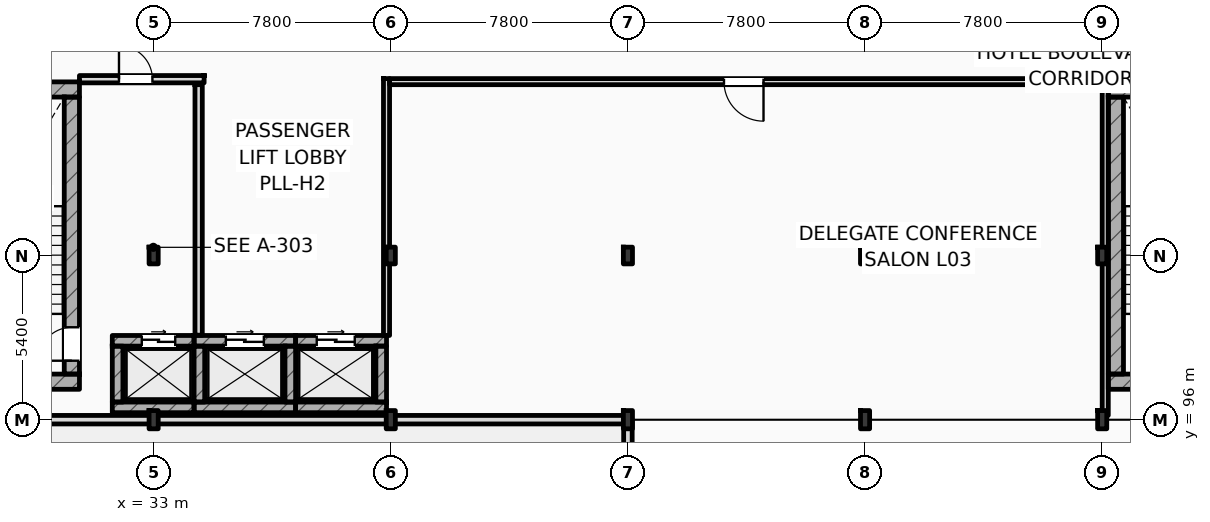
"""IFC4 building model, lengths in metres.
Left out: names, types, materials, properties, quantities, classifications, styles, units other than length and angle.
Written with IfcOpenShell. Run it as: python <this file> out.ifc"""

import sys

from ifc_helpers import new_model, si_unit, direction, frame, frame_2d, origin, origin_2d, place, context, subcontext, project, spatial, rectangle, i_section, extrude, element, fill, save


model = new_model("IFC4")
c1 = context("Model", 3, precision=1e-05, world=origin(), true_north=direction((0.0, 1.0)))
c2 = subcontext(c1, "Body", "Model", "MODEL_VIEW")
j1 = project(units=[si_unit("LENGTHUNIT", "METRE"), si_unit("PLANEANGLEUNIT", "RADIAN")], contexts=[c1])
p1 = place(None, origin())
s1 = spatial("IfcSite", under=j1, at=p1, CompositionType="ELEMENT")
p2 = place(p1, origin())
s2 = spatial("IfcBuilding", under=s1, at=p2, CompositionType="ELEMENT")
p3 = place(p2, frame((0.0, 0.0, 16.2)))
s3 = spatial("IfcBuildingStorey", under=s2, at=p3, CompositionType="ELEMENT", Elevation=16.2)
p4 = place(p3, frame((33.0, 96.0, 0.0), z_axis=(0.0, 0.0, 1.0), x_axis=(1.0, 0.0, 0.0)))
e1 = element("IfcColumn", 1, at=p4, inside=s3, PredefinedType="COLUMN", context=c2, shape_type="SweptSolid", body=[
    extrude(i_section(OverallWidth=0.3, OverallDepth=0.6, WebThickness=0.015, FlangeThickness=0.03, FilletRadius=0.027, at=origin_2d()), origin(), (0.0, 0.0, 1.0), 4.2),
])
p5 = place(p3, frame((33.0, 101.4, 0.0), z_axis=(0.0, 0.0, 1.0), x_axis=(1.0, 0.0, 0.0)))
e2 = element("IfcColumn", 2, at=p5, inside=s3, PredefinedType="COLUMN", context=c2, shape_type="SweptSolid", body=[
    extrude(i_section(OverallWidth=0.3, OverallDepth=0.55, WebThickness=0.015, FlangeThickness=0.029, FilletRadius=0.027, at=origin_2d()), origin(), (0.0, 0.0, 1.0), 4.2),
])
p6 = place(p3, frame((40.8, 96.0, 0.0), z_axis=(0.0, 0.0, 1.0), x_axis=(1.0, 0.0, 0.0)))
e3 = element("IfcColumn", 3, at=p6, inside=s3, PredefinedType="COLUMN", context=c2, shape_type="SweptSolid", body=[
    extrude(i_section(OverallWidth=0.3, OverallDepth=0.6, WebThickness=0.015, FlangeThickness=0.03, FilletRadius=0.027, at=origin_2d()), origin(), (0.0, 0.0, 1.0), 4.2),
])
p7 = place(p3, frame((40.8, 101.4, 0.0), z_axis=(0.0, 0.0, 1.0), x_axis=(1.0, 0.0, 0.0)))
e4 = element("IfcColumn", 4, at=p7, inside=s3, PredefinedType="COLUMN", context=c2, shape_type="SweptSolid", body=[
    extrude(i_section(OverallWidth=0.3, OverallDepth=0.55, WebThickness=0.015, FlangeThickness=0.029, FilletRadius=0.027, at=origin_2d()), origin(), (0.0, 0.0, 1.0), 4.2),
])
p8 = place(p3, frame((48.6, 96.0, 0.0), z_axis=(0.0, 0.0, 1.0), x_axis=(1.0, 0.0, 0.0)))
e5 = element("IfcColumn", 5, at=p8, inside=s3, PredefinedType="COLUMN", context=c2, shape_type="SweptSolid", body=[
    extrude(i_section(OverallWidth=0.3, OverallDepth=0.6, WebThickness=0.015, FlangeThickness=0.03, FilletRadius=0.027, at=origin_2d()), origin(), (0.0, 0.0, 1.0), 4.2),
])
p9 = place(p3, frame((48.6, 101.4, 0.0), z_axis=(0.0, 0.0, 1.0), x_axis=(1.0, 0.0, 0.0)))
e6 = element("IfcColumn", 6, at=p9, inside=s3, PredefinedType="COLUMN", context=c2, shape_type="SweptSolid", body=[
    extrude(i_section(OverallWidth=0.3, OverallDepth=0.55, WebThickness=0.015, FlangeThickness=0.029, FilletRadius=0.027, at=origin_2d()), origin(), (0.0, 0.0, 1.0), 4.2),
])
p10 = place(p3, frame((56.4, 96.0, 0.0), z_axis=(0.0, 0.0, 1.0), x_axis=(1.0, 0.0, 0.0)))
e7 = element("IfcColumn", 7, at=p10, inside=s3, PredefinedType="COLUMN", context=c2, shape_type="SweptSolid", body=[
    extrude(i_section(OverallWidth=0.3, OverallDepth=0.6, WebThickness=0.015, FlangeThickness=0.03, FilletRadius=0.027, at=origin_2d()), origin(), (0.0, 0.0, 1.0), 4.2),
])
p11 = place(p3, frame((56.4, 101.4, 0.0), z_axis=(0.0, 0.0, 1.0), x_axis=(1.0, 0.0, 0.0)))
e8 = element("IfcColumn", 8, at=p11, inside=s3, PredefinedType="COLUMN", context=c2, shape_type="SweptSolid", body=[
    extrude(i_section(OverallWidth=0.3, OverallDepth=0.55, WebThickness=0.015, FlangeThickness=0.029, FilletRadius=0.027, at=origin_2d()), origin(), (0.0, 0.0, 1.0), 4.2),
])
p12 = place(p3, frame((64.2, 96.0, 0.0), z_axis=(0.0, 0.0, 1.0), x_axis=(1.0, 0.0, 0.0)))
e9 = element("IfcColumn", 9, at=p12, inside=s3, PredefinedType="COLUMN", context=c2, shape_type="SweptSolid", body=[
    extrude(i_section(OverallWidth=0.3, OverallDepth=0.6, WebThickness=0.015, FlangeThickness=0.03, FilletRadius=0.027, at=origin_2d()), origin(), (0.0, 0.0, 1.0), 4.2),
])
p13 = place(p3, frame((64.2, 101.4, 0.0), z_axis=(0.0, 0.0, 1.0), x_axis=(1.0, 0.0, 0.0)))
e10 = element("IfcColumn", 10, at=p13, inside=s3, PredefinedType="COLUMN", context=c2, shape_type="SweptSolid", body=[
    extrude(i_section(OverallWidth=0.3, OverallDepth=0.55, WebThickness=0.015, FlangeThickness=0.029, FilletRadius=0.027, at=origin_2d()), origin(), (0.0, 0.0, 1.0), 4.2),
])
for number, where, z_axis, x_axis in (
    (11, (25.4, 106.862, 0.0), (0.0, 0.0, 1.0), (1.0, 0.0, 0.0)),
    (12, (25.4, 97.25, 0.0), (0.0, 0.0, 1.0), (1.0, 0.0, 0.0)),
):
    element("IfcWall", number, at=place(p3, frame(where, z_axis=z_axis, x_axis=x_axis)), inside=s3, PredefinedType="SHEAR", context=c2, shape_type="SweptSolid", body=[
        extrude(rectangle(XDim=5.16, YDim=0.5, at=frame_2d((2.58, 0.0))), origin(), (0.0, 0.0, 1.0), 4.2),
    ])
p14 = place(p3, frame((30.31, 97.5, 0.0), z_axis=(0.0, 0.0, 1.0), x_axis=(0.0, 1.0, 0.0)))
e13 = element("IfcWall", 13, at=p14, inside=s3, PredefinedType="SHEAR", context=c2, shape_type="SweptSolid", body=[
    extrude(rectangle(XDim=9.112, YDim=0.5, at=frame_2d((4.556, 0.0))), origin(), (0.0, 0.0, 1.0), 4.2),
])
p15 = place(p14, frame((0.44, 0.0, 0.0)))
e14 = element("IfcOpeningElement", 14, at=p15, cuts=e13, PredefinedType="OPENING", context=c2, shape_type="SweptSolid", body=[
    extrude(rectangle(XDim=1.1, YDim=2.2, at=frame_2d((0.55, 1.1))), frame((0.0, 0.26, 0.0), z_axis=(0.0, -1.0, 0.0), x_axis=(1.0, 0.0, 0.0)), (0.0, 0.0, 1.0), 0.52),
])
for number, where, z_axis, x_axis in (
    (15, (64.4, 106.862, 0.0), (0.0, 0.0, 1.0), (1.0, 0.0, 0.0)),
    (16, (64.4, 97.25, 0.0), (0.0, 0.0, 1.0), (1.0, 0.0, 0.0)),
):
    element("IfcWall", number, at=place(p3, frame(where, z_axis=z_axis, x_axis=x_axis)), inside=s3, PredefinedType="SHEAR", context=c2, shape_type="SweptSolid", body=[
        extrude(rectangle(XDim=5.16, YDim=0.5, at=frame_2d((2.58, 0.0))), origin(), (0.0, 0.0, 1.0), 4.2),
    ])
p16 = place(p3, frame((64.65, 97.5, 0.0), z_axis=(0.0, 0.0, 1.0), x_axis=(0.0, 1.0, 0.0)))
e17 = element("IfcWall", 17, at=p16, inside=s3, PredefinedType="SHEAR", context=c2, shape_type="SweptSolid", body=[
    extrude(rectangle(XDim=9.112, YDim=0.5, at=frame_2d((4.556, 0.0))), origin(), (0.0, 0.0, 1.0), 4.2),
])
p17 = place(p3, frame((48.6, 88.0, 0.0), z_axis=(0.0, 0.0, 1.0), x_axis=(0.0, 1.0, 0.0)))
e18 = element("IfcWall", 18, at=p17, inside=s3, PredefinedType="STANDARD", context=c2, shape_type="SweptSolid", body=[
    extrude(rectangle(XDim=8.0, YDim=0.28, at=frame_2d((4.0, 0.0))), origin(), (0.0, 0.0, 1.0), 3.92),
])
p18 = place(p3, frame((25.2, 96.0, 0.0), z_axis=(0.0, 0.0, 1.0), x_axis=(1.0, 0.0, 0.0)))
e19 = element("IfcWall", 19, at=p18, inside=s3, PredefinedType="STANDARD", context=c2, shape_type="SweptSolid", body=[
    extrude(rectangle(XDim=23.4, YDim=0.28, at=frame_2d((11.7, 0.0))), origin(), (0.0, 0.0, 1.0), 3.46),
])
p19 = place(p3, frame((31.64, 98.595, 0.0), z_axis=(0.0, 0.0, 1.0), x_axis=(1.0, 0.0, 0.0)))
e20 = element("IfcWall", 20, at=p19, inside=s3, PredefinedType="SHEAR", context=c2, shape_type="SweptSolid", body=[
    extrude(rectangle(XDim=2.69, YDim=0.35, at=frame_2d((1.345, 0.0))), origin(), (0.0, 0.0, 1.0), 3.92),
])
p20 = place(p19, frame((0.97, 0.0, 0.0)))
e21 = element("IfcOpeningElement", 21, at=p20, cuts=e20, PredefinedType="OPENING", context=c2, shape_type="SweptSolid", body=[
    extrude(rectangle(XDim=1.1, YDim=2.2, at=frame_2d((0.55, 1.1))), frame((0.0, 0.185, 0.0), z_axis=(0.0, -1.0, 0.0), x_axis=(1.0, 0.0, 0.0)), (0.0, 0.0, 1.0), 0.37),
])
p21 = place(p3, frame((31.64, 96.405, 0.0), z_axis=(0.0, 0.0, 1.0), x_axis=(1.0, 0.0, 0.0)))
e22 = element("IfcWall", 22, at=p21, inside=s3, PredefinedType="SHEAR", context=c2, shape_type="SweptSolid", body=[
    extrude(rectangle(XDim=2.69, YDim=0.35, at=frame_2d((1.345, 0.0))), origin(), (0.0, 0.0, 1.0), 3.92),
])
p22 = place(p3, frame((31.815, 96.58, 0.0), z_axis=(0.0, 0.0, 1.0), x_axis=(0.0, 1.0, 0.0)))
e23 = element("IfcWall", 23, at=p22, inside=s3, PredefinedType="SHEAR", context=c2, shape_type="SweptSolid", body=[
    extrude(rectangle(XDim=1.84, YDim=0.35, at=frame_2d((0.92, 0.0))), origin(), (0.0, 0.0, 1.0), 3.92),
])
p23 = place(p3, frame((34.33, 98.595, 0.0), z_axis=(0.0, 0.0, 1.0), x_axis=(1.0, 0.0, 0.0)))
e24 = element("IfcWall", 24, at=p23, inside=s3, PredefinedType="SHEAR", context=c2, shape_type="SweptSolid", body=[
    extrude(rectangle(XDim=3.34, YDim=0.35, at=frame_2d((1.67, 0.0))), origin(), (0.0, 0.0, 1.0), 3.92),
])
p24 = place(p23, frame((1.045, 0.0, 0.0)))
e25 = element("IfcOpeningElement", 25, at=p24, cuts=e24, PredefinedType="OPENING", context=c2, shape_type="SweptSolid", body=[
    extrude(rectangle(XDim=1.25, YDim=2.25, at=frame_2d((0.625, 1.125))), frame((0.0, 0.185, 0.0), z_axis=(0.0, -1.0, 0.0), x_axis=(1.0, 0.0, 0.0)), (0.0, 0.0, 1.0), 0.37),
])
p25 = place(p3, frame((34.33, 96.405, 0.0), z_axis=(0.0, 0.0, 1.0), x_axis=(1.0, 0.0, 0.0)))
e26 = element("IfcWall", 26, at=p25, inside=s3, PredefinedType="SHEAR", context=c2, shape_type="SweptSolid", body=[
    extrude(rectangle(XDim=3.34, YDim=0.35, at=frame_2d((1.67, 0.0))), origin(), (0.0, 0.0, 1.0), 3.92),
])
for number, where, z_axis, x_axis in (
    (27, (34.505, 96.58, 0.0), (0.0, 0.0, 1.0), (0.0, 1.0, 0.0)),
    (28, (37.495, 96.58, 0.0), (0.0, 0.0, 1.0), (0.0, 1.0, 0.0)),
):
    element("IfcWall", number, at=place(p3, frame(where, z_axis=z_axis, x_axis=x_axis)), inside=s3, PredefinedType="SHEAR", context=c2, shape_type="SweptSolid", body=[
        extrude(rectangle(XDim=1.84, YDim=0.35, at=frame_2d((0.92, 0.0))), origin(), (0.0, 0.0, 1.0), 3.92),
    ])
p26 = place(p3, frame((37.67, 98.595, 0.0), z_axis=(0.0, 0.0, 1.0), x_axis=(1.0, 0.0, 0.0)))
e29 = element("IfcWall", 29, at=p26, inside=s3, PredefinedType="SHEAR", context=c2, shape_type="SweptSolid", body=[
    extrude(rectangle(XDim=2.99, YDim=0.35, at=frame_2d((1.495, 0.0))), origin(), (0.0, 0.0, 1.0), 3.92),
])
p27 = place(p26, frame((0.695, 0.0, 0.0)))
e30 = element("IfcOpeningElement", 30, at=p27, cuts=e29, PredefinedType="OPENING", context=c2, shape_type="SweptSolid", body=[
    extrude(rectangle(XDim=1.25, YDim=2.25, at=frame_2d((0.625, 1.125))), frame((0.0, 0.185, 0.0), z_axis=(0.0, -1.0, 0.0), x_axis=(1.0, 0.0, 0.0)), (0.0, 0.0, 1.0), 0.37),
])
p28 = place(p3, frame((37.67, 96.405, 0.0), z_axis=(0.0, 0.0, 1.0), x_axis=(1.0, 0.0, 0.0)))
e31 = element("IfcWall", 31, at=p28, inside=s3, PredefinedType="SHEAR", context=c2, shape_type="SweptSolid", body=[
    extrude(rectangle(XDim=2.99, YDim=0.35, at=frame_2d((1.495, 0.0))), origin(), (0.0, 0.0, 1.0), 3.92),
])
p29 = place(p3, frame((40.485, 96.58, 0.0), z_axis=(0.0, 0.0, 1.0), x_axis=(0.0, 1.0, 0.0)))
e32 = element("IfcWall", 32, at=p29, inside=s3, PredefinedType="SHEAR", context=c2, shape_type="SweptSolid", body=[
    extrude(rectangle(XDim=1.84, YDim=0.35, at=frame_2d((0.92, 0.0))), origin(), (0.0, 0.0, 1.0), 3.51),
])
p30 = place(p3, frame((34.48, 98.78, 0.0), z_axis=(0.0, 0.0, 1.0), x_axis=(0.0, 1.0, 0.0)))
e33 = element("IfcWall", 33, at=p30, inside=s3, PredefinedType="STANDARD", context=c2, shape_type="SweptSolid", body=[
    extrude(rectangle(XDim=8.24, YDim=0.24, at=frame_2d((4.12, 0.0))), origin(), (0.0, 0.0, 1.0), 3.92),
])
p31 = place(p3, frame((30.56, 107.2, 0.0), z_axis=(0.0, 0.0, 1.0), x_axis=(1.0, 0.0, 0.0)))
e34 = element("IfcWall", 34, at=p31, inside=s3, PredefinedType="STANDARD", context=c2, shape_type="SweptSolid", body=[
    extrude(rectangle(XDim=4.1, YDim=0.24, at=frame_2d((2.05, 0.0))), origin(), (0.0, 0.0, 1.0), 3.92),
])
p32 = place(p31, frame((1.3, 0.0, 0.0)))
e35 = element("IfcOpeningElement", 35, at=p32, cuts=e34, PredefinedType="OPENING", context=c2, shape_type="SweptSolid", body=[
    extrude(rectangle(XDim=1.1, YDim=2.2, at=frame_2d((0.55, 1.1))), frame((0.0, 0.13, 0.0), z_axis=(0.0, -1.0, 0.0), x_axis=(1.0, 0.0, 0.0)), (0.0, 0.0, 1.0), 0.26),
])
p33 = place(p3, frame((40.76, 107.12, 0.0), z_axis=(0.0, 0.0, 1.0), x_axis=(1.0, 0.0, 0.0)))
e36 = element("IfcWall", 36, at=p33, inside=s3, PredefinedType="PARTITIONING", context=c2, shape_type="SweptSolid", body=[
    extrude(rectangle(XDim=23.44, YDim=0.2, at=frame_2d((11.72, 0.0))), origin(), (0.0, 0.0, 1.0), 3.92),
])
p34 = place(p33, frame((11.0, 0.0, 0.0)))
e37 = element("IfcOpeningElement", 37, at=p34, cuts=e36, PredefinedType="OPENING", context=c2, shape_type="SweptSolid", body=[
    extrude(rectangle(XDim=1.3, YDim=2.2, at=frame_2d((0.65, 1.1))), frame((0.0, 0.11, 0.0), z_axis=(0.0, -1.0, 0.0), x_axis=(1.0, 0.0, 0.0)), (0.0, 0.0, 1.0), 0.22),
])
p35 = place(p3, frame((40.66, 98.77, 0.0), z_axis=(0.0, 0.0, 1.0), x_axis=(0.0, 1.0, 0.0)))
e38 = element("IfcWall", 38, at=p35, inside=s3, PredefinedType="PARTITIONING", context=c2, shape_type="SweptSolid", body=[
    extrude(rectangle(XDim=8.45, YDim=0.2, at=frame_2d((4.225, 0.0))), origin(), (0.0, 0.0, 1.0), 3.51),
])
p36 = place(p3, frame((64.3, 96.14, 0.0), z_axis=(0.0, 0.0, 1.0), x_axis=(0.0, 1.0, 0.0)))
e39 = element("IfcWall", 39, at=p36, inside=s3, PredefinedType="PARTITIONING", context=c2, shape_type="SweptSolid", body=[
    extrude(rectangle(XDim=11.08, YDim=0.2, at=frame_2d((5.54, 0.0))), origin(), (0.0, 0.0, 1.0), 3.51),
])
p37 = place(p15, origin())
e40 = element("IfcDoor", 40, at=p37, inside=s3, OperationType="SINGLE_SWING_LEFT", PredefinedType="DOOR", context=c2, shape_type="SweptSolid", body=[
    extrude(rectangle(XDim=1.1, YDim=2.2, at=frame_2d((0.55, 1.1))), frame((0.0, 0.025, 0.0), z_axis=(0.0, -1.0, 0.0), x_axis=(1.0, 0.0, 0.0)), (0.0, 0.0, 1.0), 0.05),
])
fill(e14, e40)
p38 = place(p20, origin())
e41 = element("IfcDoor", 41, at=p38, inside=s3, OperationType="SLIDING_TO_LEFT", PredefinedType="DOOR", context=c2, shape_type="SweptSolid", body=[
    extrude(rectangle(XDim=1.1, YDim=2.2, at=frame_2d((0.55, 1.1))), frame((0.0, 0.025, 0.0), z_axis=(0.0, -1.0, 0.0), x_axis=(1.0, 0.0, 0.0)), (0.0, 0.0, 1.0), 0.05),
])
fill(e21, e41)
p39 = place(p24, origin())
e42 = element("IfcDoor", 42, at=p39, inside=s3, OperationType="SLIDING_TO_LEFT", PredefinedType="DOOR", context=c2, shape_type="SweptSolid", body=[
    extrude(rectangle(XDim=1.25, YDim=2.25, at=frame_2d((0.625, 1.125))), frame((0.0, 0.025, 0.0), z_axis=(0.0, -1.0, 0.0), x_axis=(1.0, 0.0, 0.0)), (0.0, 0.0, 1.0), 0.05),
])
fill(e25, e42)
p40 = place(p27, origin())
e43 = element("IfcDoor", 43, at=p40, inside=s3, OperationType="SLIDING_TO_LEFT", PredefinedType="DOOR", context=c2, shape_type="SweptSolid", body=[
    extrude(rectangle(XDim=1.25, YDim=2.25, at=frame_2d((0.625, 1.125))), frame((0.0, 0.025, 0.0), z_axis=(0.0, -1.0, 0.0), x_axis=(1.0, 0.0, 0.0)), (0.0, 0.0, 1.0), 0.05),
])
fill(e30, e43)
p41 = place(p32, origin())
e44 = element("IfcDoor", 44, at=p41, inside=s3, OperationType="SINGLE_SWING_LEFT", PredefinedType="DOOR", context=c2, shape_type="SweptSolid", body=[
    extrude(rectangle(XDim=1.1, YDim=2.2, at=frame_2d((0.55, 1.1))), frame((0.0, 0.025, 0.0), z_axis=(0.0, -1.0, 0.0), x_axis=(1.0, 0.0, 0.0)), (0.0, 0.0, 1.0), 0.05),
])
fill(e35, e44)
p42 = place(p34, frame((1.3, 0.0, 0.0), z_axis=(0.0, 0.0, 1.0), x_axis=(-1.0, 0.0, 0.0)))
e45 = element("IfcDoor", 45, at=p42, inside=s3, OperationType="SINGLE_SWING_RIGHT", PredefinedType="DOOR", context=c2, shape_type="SweptSolid", body=[
    extrude(rectangle(XDim=1.3, YDim=2.2, at=frame_2d((0.65, 1.1))), frame((0.0, 0.025, 0.0), z_axis=(0.0, -1.0, 0.0), x_axis=(1.0, 0.0, 0.0)), (0.0, 0.0, 1.0), 0.05),
])
fill(e37, e45)
save(model, sys.argv[1])
